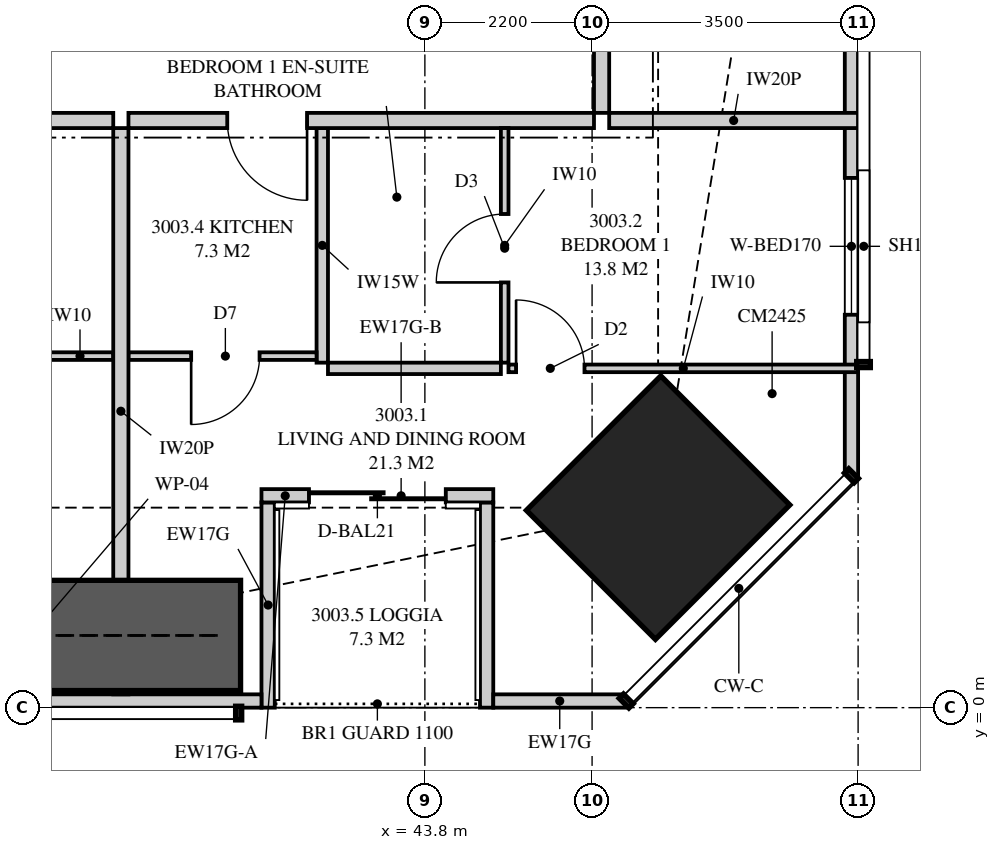
"""IFC4 building model, lengths in metres.
Left out: names, types, materials, properties, quantities, classifications, styles, units other than length and angle.
Written with IfcOpenShell. Run it as: python <this file> out.ifc"""

import sys

from ifc_helpers import new_model, si_unit, direction, frame, frame_2d, origin, origin_2d, place, context, subcontext, project, spatial, polyline, rectangle, outline, extrude, element, fill, save


model = new_model("IFC4")
c1 = context("Model", 3, precision=1e-05, world=origin(), true_north=direction((0.0, 1.0)))
c2 = subcontext(c1, "Body", "Model", "MODEL_VIEW")
j1 = project(units=[si_unit("LENGTHUNIT", "METRE"), si_unit("PLANEANGLEUNIT", "RADIAN")], contexts=[c1])
p1 = place(None, origin())
s1 = spatial("IfcSite", under=j1, at=p1, CompositionType="ELEMENT")
p2 = place(p1, origin())
s2 = spatial("IfcBuilding", under=s1, at=p2, CompositionType="ELEMENT")
p3 = place(p2, frame((0.0, 0.0, 111.55)))
s3 = spatial("IfcBuildingStorey", under=s2, at=p3, CompositionType="ELEMENT", Elevation=111.55)
p4 = place(p3, frame((46.869, 2.631, 0.0), z_axis=(0.0, 0.0, 1.0), x_axis=(-0.707106781187, 0.707106781187, 0.0)))
e1 = element("IfcColumn", 1, at=p4, inside=s3, PredefinedType="COLUMN", context=c2, shape_type="SweptSolid", body=[
    extrude(rectangle(XDim=2.4, YDim=2.5, at=origin_2d()), origin(), (0.0, 0.0, 1.0), 3.35),
])
p5 = place(p3, frame((33.9, 0.087, 0.0), z_axis=(0.0, 0.0, 1.0), x_axis=(1.0, 0.0, 0.0)))
e2 = element("IfcWall", 2, at=p5, inside=s3, PredefinedType="SOLIDWALL", context=c2, shape_type="SweptSolid", body=[
    extrude(outline(polyline([(0.0, 0.0), (7.75, 0.0), (7.75, 3.11), (4.928, 3.11), (4.928, 2.15), (4.883, 2.15), (4.883, 3.11), (4.725, 3.11), (4.725, 2.15), (0.0, 2.15), (0.0, 0.0)])), frame((0.0, 0.087, 0.0), z_axis=(0.0, -1.0, 0.0), x_axis=(1.0, 0.0, 0.0)), (0.0, 0.0, 1.0), 0.175),
])
p6 = place(p5, frame((0.64, 0.0, 0.4)))
e3 = element("IfcOpeningElement", 3, at=p6, cuts=e2, PredefinedType="OPENING", context=c2, shape_type="SweptSolid", body=[
    extrude(rectangle(XDim=1.2, YDim=1.7, at=frame_2d((0.6, 0.85))), frame((0.0, 0.097, 0.0), z_axis=(0.0, -1.0, 0.0), x_axis=(1.0, 0.0, 0.0)), (0.0, 0.0, 1.0), 0.195),
])
p7 = place(p3, frame((44.7, 0.087, 0.0), z_axis=(0.0, 0.0, 1.0), x_axis=(1.0, 0.0, 0.0)))
e4 = element("IfcWall", 4, at=p7, inside=s3, PredefinedType="SOLIDWALL", context=c2, shape_type="SweptSolid", body=[
    extrude(rectangle(XDim=1.749, YDim=0.175, at=frame_2d((0.875, 0.0))), origin(), (0.0, 0.0, 1.0), 3.11),
])
p8 = place(p3, frame((41.65, 2.788, 0.0), z_axis=(0.0, 0.0, 1.0), x_axis=(1.0, 0.0, 0.0)))
e5 = element("IfcWall", 5, at=p8, inside=s3, PredefinedType="SOLIDWALL", context=c2, shape_type="SweptSolid", body=[
    extrude(rectangle(XDim=0.625, YDim=0.175, at=frame_2d((0.312, 0.0))), origin(), (0.0, 0.0, 1.0), 2.51),
])
p9 = place(p3, frame((42.275, 2.788, 0.0), z_axis=(0.0, 0.0, 1.0), x_axis=(1.0, 0.0, 0.0)))
e6 = element("IfcWall", 6, at=p9, inside=s3, PredefinedType="SOLIDWALL", context=c2, shape_type="SweptSolid", body=[
    extrude(rectangle(XDim=2.425, YDim=0.175, at=frame_2d((1.212, 0.0))), origin(), (0.0, 0.0, 1.0), 2.15),
])
p10 = place(p9, origin())
e7 = element("IfcOpeningElement", 7, at=p10, cuts=e6, PredefinedType="OPENING", context=c2, shape_type="SweptSolid", body=[
    extrude(rectangle(XDim=1.8, YDim=2.1, at=frame_2d((0.9, 1.05))), frame((0.0, 0.097, 0.0), z_axis=(0.0, -1.0, 0.0), x_axis=(1.0, 0.0, 0.0)), (0.0, 0.0, 1.0), 0.195),
])
p11 = place(p3, frame((41.738, 0.0, 0.0), z_axis=(0.0, 0.0, 1.0), x_axis=(0.0, 1.0, 0.0)))
e8 = element("IfcWall", 8, at=p11, inside=s3, PredefinedType="SOLIDWALL", context=c2, shape_type="SweptSolid", body=[
    extrude(outline(polyline([(0.0, 0.0), (2.7, 0.0), (2.7, 2.51), (2.419, 2.51), (2.419, 2.15), (0.75, 2.15), (0.75, 3.11), (0.0, 3.11), (0.0, 0.0)])), frame((0.0, 0.087, 0.0), z_axis=(0.0, -1.0, 0.0), x_axis=(1.0, 0.0, 0.0)), (0.0, 0.0, 1.0), 0.175),
])
p12 = place(p3, frame((44.613, 0.0, 0.0), z_axis=(0.0, 0.0, 1.0), x_axis=(0.0, 1.0, 0.0)))
e9 = element("IfcWall", 9, at=p12, inside=s3, PredefinedType="SOLIDWALL", context=c2, shape_type="SweptSolid", body=[
    extrude(outline(polyline([(0.0, 0.0), (2.7, 0.0), (2.7, 2.15), (1.337, 2.15), (1.337, 3.11), (0.0, 3.11), (0.0, 0.0)])), frame((0.0, 0.087, 0.0), z_axis=(0.0, -1.0, 0.0), x_axis=(1.0, 0.0, 0.0)), (0.0, 0.0, 1.0), 0.175),
])
p13 = place(p3, frame((49.413, 3.051, 0.0), z_axis=(0.0, 0.0, 1.0), x_axis=(0.0, 1.0, 0.0)))
e10 = element("IfcWall", 10, at=p13, inside=s3, PredefinedType="SOLIDWALL", context=c2, shape_type="SweptSolid", body=[
    extrude(outline(polyline([(0.0, 0.0), (31.897, 0.0), (31.897, 3.11), (22.167, 3.11), (22.167, 2.15), (22.074, 2.15), (22.074, 3.11), (21.949, 3.11), (21.949, 2.15), (9.949, 2.15), (9.949, 3.11), (9.823, 3.11), (9.823, 2.15), (9.73, 2.15), (9.73, 3.11), (0.0, 3.11), (0.0, 0.0)])), frame((0.0, 0.087, 0.0), z_axis=(0.0, -1.0, 0.0), x_axis=(1.0, 0.0, 0.0)), (0.0, 0.0, 1.0), 0.175),
])
p14 = place(p13, frame((2.118, 0.0, 0.4)))
e11 = element("IfcOpeningElement", 11, at=p14, cuts=e10, PredefinedType="OPENING", context=c2, shape_type="SweptSolid", body=[
    extrude(rectangle(XDim=1.8, YDim=1.7, at=frame_2d((0.9, 0.85))), frame((0.0, 0.097, 0.0), z_axis=(0.0, -1.0, 0.0), x_axis=(1.0, 0.0, 0.0)), (0.0, 0.0, 1.0), 0.195),
])
p15 = place(p13, frame((14.849, 0.0, 0.4)))
e12 = element("IfcOpeningElement", 12, at=p15, cuts=e10, PredefinedType="OPENING", context=c2, shape_type="SweptSolid", body=[
    extrude(rectangle(XDim=1.2, YDim=1.7, at=frame_2d((0.6, 0.85))), frame((0.0, 0.097, 0.0), z_axis=(0.0, -1.0, 0.0), x_axis=(1.0, 0.0, 0.0)), (0.0, 0.0, 1.0), 0.195),
])
p16 = place(p13, frame((28.51, 0.0, 0.4)))
e13 = element("IfcOpeningElement", 13, at=p16, cuts=e10, PredefinedType="OPENING", context=c2, shape_type="SweptSolid", body=[
    extrude(rectangle(XDim=1.2, YDim=1.7, at=frame_2d((0.6, 0.85))), frame((0.0, 0.097, 0.0), z_axis=(0.0, -1.0, 0.0), x_axis=(1.0, 0.0, 0.0)), (0.0, 0.0, 1.0), 0.195),
])
p17 = place(p3, frame((39.8, 0.175, 0.0), z_axis=(0.0, 0.0, 1.0), x_axis=(0.0, 1.0, 0.0)))
e14 = element("IfcWall", 14, at=p17, inside=s3, PredefinedType="PARTITIONING", context=c2, shape_type="SweptSolid", body=[
    extrude(outline(polyline([(0.086, 3.11), (0.0, 3.11), (0.0, 0.0), (0.529, 0.0), (0.529, 0.701), (1.021, 0.701), (1.021, 0.0), (7.45, 0.0), (7.45, 3.11), (3.766, 3.11), (3.766, 2.51), (1.943, 2.51), (1.943, 2.15), (1.021, 2.15), (1.021, 1.449), (0.529, 1.449), (0.529, 2.15), (0.086, 2.15), (0.086, 3.11)])), frame((0.0, 0.1, 0.0), z_axis=(0.0, -1.0, 0.0), x_axis=(1.0, 0.0, 0.0)), (0.0, 0.0, 1.0), 0.2),
])
p18 = place(p3, frame((36.15, 4.625, 0.0), z_axis=(0.0, 0.0, 1.0), x_axis=(1.0, 0.0, 0.0)))
e15 = element("IfcWall", 15, at=p18, inside=s3, PredefinedType="PARTITIONING", context=c2, shape_type="SweptSolid", body=[
    extrude(outline(polyline([(0.0, 0.0), (3.55, 0.0), (3.55, 3.11), (2.762, 3.11), (2.762, 2.541), (2.188, 2.541), (2.188, 3.11), (0.0, 3.11), (0.0, 0.0)])), frame((0.0, 0.05, 0.0), z_axis=(0.0, -1.0, 0.0), x_axis=(1.0, 0.0, 0.0)), (0.0, 0.0, 1.0), 0.1),
])
p19 = place(p18, frame((1.3, 0.0, 0.0)))
e16 = element("IfcOpeningElement", 16, at=p19, cuts=e15, PredefinedType="OPENING", context=c2, shape_type="SweptSolid", body=[
    extrude(rectangle(XDim=0.9, YDim=2.1, at=frame_2d((0.45, 1.05))), frame((0.0, 0.06, 0.0), z_axis=(0.0, -1.0, 0.0), x_axis=(1.0, 0.0, 0.0)), (0.0, 0.0, 1.0), 0.12),
])
p20 = place(p3, frame((39.9, 7.725, 0.0), z_axis=(0.0, 0.0, 1.0), x_axis=(1.0, 0.0, 0.0)))
e17 = element("IfcWall", 17, at=p20, inside=s3, PredefinedType="PARTITIONING", context=c2, shape_type="SweptSolid", body=[
    extrude(rectangle(XDim=6.125, YDim=0.2, at=frame_2d((3.062, 0.0))), origin(), (0.0, 0.0, 1.0), 3.11),
])
p21 = place(p20, frame((1.3, 0.0, 0.0)))
e18 = element("IfcOpeningElement", 18, at=p21, cuts=e17, PredefinedType="OPENING", context=c2, shape_type="SweptSolid", body=[
    extrude(rectangle(XDim=1.05, YDim=2.2, at=frame_2d((0.525, 1.1))), frame((0.0, 0.11, 0.0), z_axis=(0.0, -1.0, 0.0), x_axis=(1.0, 0.0, 0.0)), (0.0, 0.0, 1.0), 0.22),
])
p22 = place(p3, frame((44.85, 4.539, 0.0), z_axis=(0.0, 0.0, 1.0), x_axis=(0.0, 1.0, 0.0)))
e19 = element("IfcWall", 19, at=p22, inside=s3, PredefinedType="PARTITIONING", context=c2, shape_type="SweptSolid", body=[
    extrude(rectangle(XDim=3.086, YDim=0.1, at=frame_2d((1.543, 0.0))), origin(), (0.0, 0.0, 1.0), 3.11),
])
p23 = place(p22, frame((1.056, 0.0, 0.0)))
e20 = element("IfcOpeningElement", 20, at=p23, cuts=e19, PredefinedType="OPENING", context=c2, shape_type="SweptSolid", body=[
    extrude(rectangle(XDim=0.9, YDim=2.1, at=frame_2d((0.45, 1.05))), frame((0.0, 0.06, 0.0), z_axis=(0.0, -1.0, 0.0), x_axis=(1.0, 0.0, 0.0)), (0.0, 0.0, 1.0), 0.12),
])
p24 = place(p3, frame((44.9, 4.464, 0.0), z_axis=(0.0, 0.0, 1.0), x_axis=(1.0, 0.0, 0.0)))
e21 = element("IfcWall", 21, at=p24, inside=s3, PredefinedType="PARTITIONING", context=c2, shape_type="SweptSolid", body=[
    extrude(outline(polyline([(0.0, 0.0), (4.6, 0.0), (4.6, 3.11), (3.137, 3.11), (3.137, 2.15), (1.395, 2.15), (1.395, 3.11), (0.0, 3.11), (0.0, 0.0)])), frame((0.0, 0.05, 0.0), z_axis=(0.0, -1.0, 0.0), x_axis=(1.0, 0.0, 0.0)), (0.0, 0.0, 1.0), 0.1),
])
p25 = place(p24, frame((0.1, 0.0, 0.0)))
e22 = element("IfcOpeningElement", 22, at=p25, cuts=e21, PredefinedType="OPENING", context=c2, shape_type="SweptSolid", body=[
    extrude(rectangle(XDim=0.9, YDim=2.1, at=frame_2d((0.45, 1.05))), frame((0.0, 0.06, 0.0), z_axis=(0.0, -1.0, 0.0), x_axis=(1.0, 0.0, 0.0)), (0.0, 0.0, 1.0), 0.12),
])
p26 = place(p3, frame((42.525, 4.464, 0.0), z_axis=(0.0, 0.0, 1.0), x_axis=(1.0, 0.0, 0.0)))
e23 = element("IfcWall", 23, at=p26, inside=s3, PredefinedType="PLUMBINGWALL", context=c2, shape_type="SweptSolid", body=[
    extrude(rectangle(XDim=2.275, YDim=0.15, at=frame_2d((1.138, 0.0))), origin(), (0.0, 0.0, 1.0), 3.11),
])
p27 = place(p3, frame((42.45, 4.539, 0.0), z_axis=(0.0, 0.0, 1.0), x_axis=(0.0, 1.0, 0.0)))
e24 = element("IfcWall", 24, at=p27, inside=s3, PredefinedType="PLUMBINGWALL", context=c2, shape_type="SweptSolid", body=[
    extrude(rectangle(XDim=3.086, YDim=0.15, at=frame_2d((1.543, 0.0))), origin(), (0.0, 0.0, 1.0), 3.11),
])
p28 = place(p3, frame((39.9, 4.625, 0.0), z_axis=(0.0, 0.0, 1.0), x_axis=(1.0, 0.0, 0.0)))
e25 = element("IfcWall", 25, at=p28, inside=s3, PredefinedType="PARTITIONING", context=c2, shape_type="SweptSolid", body=[
    extrude(rectangle(XDim=2.475, YDim=0.1, at=frame_2d((1.238, 0.0))), origin(), (0.0, 0.0, 1.0), 3.11),
])
p29 = place(p28, frame((0.825, 0.0, 0.0)))
e26 = element("IfcOpeningElement", 26, at=p29, cuts=e25, PredefinedType="OPENING", context=c2, shape_type="SweptSolid", body=[
    extrude(rectangle(XDim=0.9, YDim=2.1, at=frame_2d((0.45, 1.05))), frame((0.0, 0.06, 0.0), z_axis=(0.0, -1.0, 0.0), x_axis=(1.0, 0.0, 0.0)), (0.0, 0.0, 1.0), 0.12),
])
p30 = place(p3, frame((46.225, 7.725, 0.0), z_axis=(0.0, 0.0, 1.0), x_axis=(1.0, 0.0, 0.0)))
e27 = element("IfcWall", 27, at=p30, inside=s3, PredefinedType="PARTITIONING", context=c2, shape_type="SweptSolid", body=[
    extrude(outline(polyline([(0.0, 0.0), (3.275, 0.0), (3.275, 3.11), (2.392, 3.11), (2.392, 2.15), (0.643, 2.15), (0.643, 2.541), (0.306, 2.541), (0.306, 3.11), (0.0, 3.11), (0.0, 0.0)])), frame((0.0, 0.1, 0.0), z_axis=(0.0, -1.0, 0.0), x_axis=(1.0, 0.0, 0.0)), (0.0, 0.0, 1.0), 0.2),
])
p31 = place(p3, frame((46.125, 7.825, 0.0), z_axis=(0.0, 0.0, 1.0), x_axis=(0.0, 1.0, 0.0)))
e28 = element("IfcWall", 28, at=p31, inside=s3, PredefinedType="PARTITIONING", context=c2, shape_type="SweptSolid", body=[
    extrude(outline(polyline([(0.0, 0.0), (21.35, 0.0), (21.35, 3.11), (17.512, 3.11), (17.512, 2.541), (16.838, 2.541), (16.838, 3.11), (5.512, 3.11), (5.512, 2.541), (4.838, 2.541), (4.838, 3.11), (0.0, 3.11), (0.0, 0.0)])), frame((0.0, 0.1, 0.0), z_axis=(0.0, -1.0, 0.0), x_axis=(1.0, 0.0, 0.0)), (0.0, 0.0, 1.0), 0.2),
])
p32 = place(p31, frame((9.775, 0.0, 0.0)))
e29 = element("IfcOpeningElement", 29, at=p32, cuts=e28, PredefinedType="OPENING", context=c2, shape_type="SweptSolid", body=[
    extrude(rectangle(XDim=1.8, YDim=2.1, at=frame_2d((0.9, 1.05))), frame((0.0, 0.11, 0.0), z_axis=(0.0, -1.0, 0.0), x_axis=(1.0, 0.0, 0.0)), (0.0, 0.0, 1.0), 0.22),
])
p33 = place(p31, frame((19.5, 0.0, 0.0)))
e30 = element("IfcOpeningElement", 30, at=p33, cuts=e28, PredefinedType="OPENING", context=c2, shape_type="SweptSolid", body=[
    extrude(rectangle(XDim=1.0, YDim=2.1, at=frame_2d((0.5, 1.05))), frame((0.0, 0.11, 0.0), z_axis=(0.0, -1.0, 0.0), x_axis=(1.0, 0.0, 0.0)), (0.0, 0.0, 1.0), 0.22),
])
p34 = place(p3, frame((34.55, 7.725, 0.0), z_axis=(0.0, 0.0, 1.0), x_axis=(1.0, 0.0, 0.0)))
e31 = element("IfcWall", 31, at=p34, inside=s3, PredefinedType="PARTITIONING", context=c2, shape_type="SweptSolid", body=[
    extrude(outline(polyline([(0.0, 0.0), (5.15, 0.0), (5.15, 3.11), (4.412, 3.11), (4.412, 2.541), (3.738, 2.541), (3.738, 3.11), (0.0, 3.11), (0.0, 0.0)])), frame((0.0, 0.1, 0.0), z_axis=(0.0, -1.0, 0.0), x_axis=(1.0, 0.0, 0.0)), (0.0, 0.0, 1.0), 0.2),
])
p35 = place(p3, frame((35.875, 0.95, 0.0), z_axis=(0.0, 0.0, 1.0), x_axis=(1.0, 0.0, 0.0)))
e32 = element("IfcWall", 32, at=p35, inside=s3, PredefinedType="SHEAR", context=c2, shape_type="SweptSolid", body=[
    extrude(rectangle(XDim=5.5, YDim=1.45, at=frame_2d((2.75, 0.0))), origin(), (0.0, 0.0, 1.0), 3.35),
])
p36 = place(p10, origin())
e33 = element("IfcDoor", 33, at=p36, inside=s3, OperationType="SLIDING_TO_LEFT", PredefinedType="DOOR", context=c2, shape_type="SweptSolid", body=[
    extrude(rectangle(XDim=1.8, YDim=2.1, at=frame_2d((0.9, 1.05))), frame((0.0, 0.025, 0.0), z_axis=(0.0, -1.0, 0.0), x_axis=(1.0, 0.0, 0.0)), (0.0, 0.0, 1.0), 0.05),
])
fill(e7, e33)
p37 = place(p14, origin())
e34 = element("IfcWindow", 34, at=p37, inside=s3, PartitioningType="SINGLE_PANEL", PredefinedType="WINDOW", context=c2, shape_type="SweptSolid", body=[
    extrude(rectangle(XDim=1.8, YDim=1.7, at=frame_2d((0.9, 0.85))), frame((0.0, 0.03, 0.0), z_axis=(0.0, -1.0, 0.0), x_axis=(1.0, 0.0, 0.0)), (0.0, 0.0, 1.0), 0.06),
])
fill(e11, e34)
p38 = place(p21, frame((1.05, 0.0, 0.0), z_axis=(0.0, 0.0, 1.0), x_axis=(-1.0, 0.0, 0.0)))
e35 = element("IfcDoor", 35, at=p38, inside=s3, OperationType="SINGLE_SWING_LEFT", PredefinedType="DOOR", context=c2, shape_type="SweptSolid", body=[
    extrude(rectangle(XDim=1.05, YDim=2.2, at=frame_2d((0.525, 1.1))), frame((0.0, 0.025, 0.0), z_axis=(0.0, -1.0, 0.0), x_axis=(1.0, 0.0, 0.0)), (0.0, 0.0, 1.0), 0.05),
])
fill(e18, e35)
p39 = place(p25, origin())
e36 = element("IfcDoor", 36, at=p39, inside=s3, OperationType="SINGLE_SWING_LEFT", PredefinedType="DOOR", context=c2, shape_type="SweptSolid", body=[
    extrude(rectangle(XDim=0.9, YDim=2.1, at=frame_2d((0.45, 1.05))), frame((0.0, 0.025, 0.0), z_axis=(0.0, -1.0, 0.0), x_axis=(1.0, 0.0, 0.0)), (0.0, 0.0, 1.0), 0.05),
])
fill(e22, e36)
p40 = place(p23, origin())
e37 = element("IfcDoor", 37, at=p40, inside=s3, OperationType="SINGLE_SWING_LEFT", PredefinedType="DOOR", context=c2, shape_type="SweptSolid", body=[
    extrude(rectangle(XDim=0.9, YDim=2.1, at=frame_2d((0.45, 1.05))), frame((0.0, 0.025, 0.0), z_axis=(0.0, -1.0, 0.0), x_axis=(1.0, 0.0, 0.0)), (0.0, 0.0, 1.0), 0.05),
])
fill(e20, e37)
p41 = place(p29, frame((0.9, 0.0, 0.0), z_axis=(0.0, 0.0, 1.0), x_axis=(-1.0, 0.0, 0.0)))
e38 = element("IfcDoor", 38, at=p41, inside=s3, OperationType="SINGLE_SWING_RIGHT", PredefinedType="DOOR", context=c2, shape_type="SweptSolid", body=[
    extrude(rectangle(XDim=0.9, YDim=2.1, at=frame_2d((0.45, 1.05))), frame((0.0, 0.025, 0.0), z_axis=(0.0, -1.0, 0.0), x_axis=(1.0, 0.0, 0.0)), (0.0, 0.0, 1.0), 0.05),
])
fill(e26, e38)
save(model, sys.argv[1])
